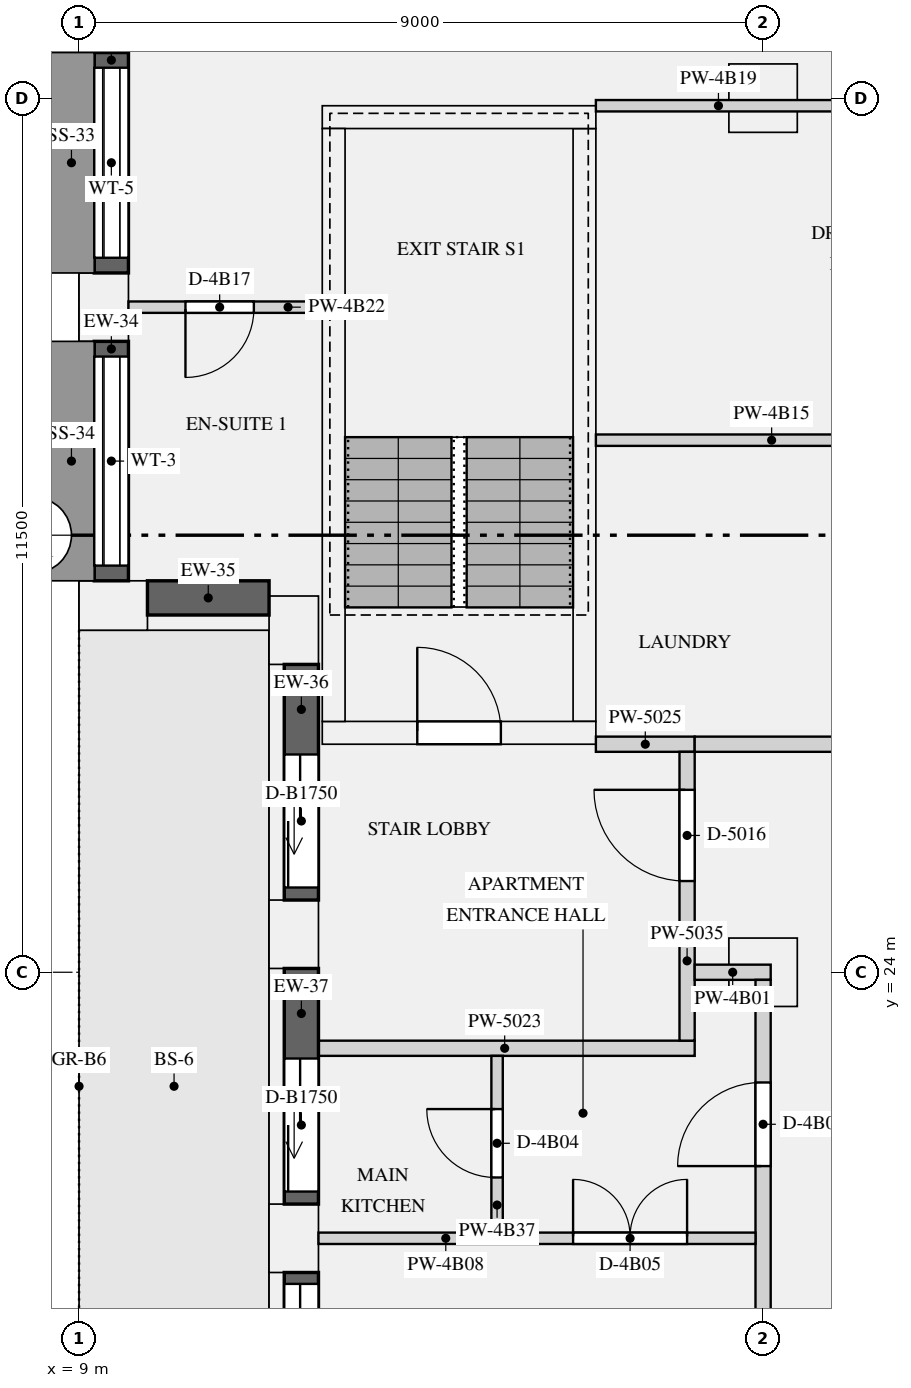
"""IFC4 building model, lengths in metres.
Left out: names, types, materials, properties, quantities, classifications, styles, units other than length and angle.
Written with IfcOpenShell. Run it as: python <this file> out.ifc"""

import sys

from ifc_helpers import new_model, si_unit, direction, frame, frame_2d, origin, origin_2d, place, context, subcontext, project, spatial, rectangle, extrude, element, fill, save


model = new_model("IFC4")
c1 = context("Model", 3, precision=1e-05, world=origin(), true_north=direction((0.0, 1.0)))
c2 = subcontext(c1, "Body", "Model", "MODEL_VIEW")
j1 = project(units=[si_unit("LENGTHUNIT", "METRE"), si_unit("PLANEANGLEUNIT", "RADIAN")], contexts=[c1])
p1 = place(None, origin())
s1 = spatial("IfcSite", under=j1, at=p1, CompositionType="ELEMENT")
p2 = place(p1, origin())
s2 = spatial("IfcBuilding", under=s1, at=p2, CompositionType="ELEMENT")
p3 = place(p2, frame((0.0, 0.0, 207.45)))
s3 = spatial("IfcBuildingStorey", under=s2, at=p3, CompositionType="ELEMENT", Elevation=207.45)
for number, where, z_axis, x_axis in (
    (1, (9.325, 32.75, 0.0), (0.0, 0.0, 1.0), (0.0, -1.0, 0.0)),
    (2, (9.45, 28.825, 0.0), (0.0, 0.0, 1.0), (1.0, 0.0, 0.0)),
    (3, (11.825, 28.5, 0.0), (0.0, 0.0, 1.0), (0.0, -1.0, 0.0)),
    (4, (11.825, 24.5, 0.0), (0.0, 0.0, 1.0), (0.0, -1.0, 0.0)),
    (5, (11.825, 20.5, 0.0), (0.0, 0.0, 1.0), (0.0, -1.0, 0.0)),
):
    element("IfcColumn", number, at=place(p3, frame(where, z_axis=z_axis, x_axis=x_axis)), inside=s3, PredefinedType="USERDEFINED", context=c2, shape_type="SweptSolid", body=[
        extrude(rectangle(XDim=0.9, YDim=0.65, at=origin_2d()), origin(), (0.0, 0.0, 1.0), 3.15),
    ])
for number, where, z_axis, x_axis in (
    (6, (18.0, 24.0, 0.0), (0.0, 0.0, 1.0), (1.0, 0.0, 0.0)),
    (7, (18.0, 35.5, 0.0), (0.0, 0.0, 1.0), (1.0, 0.0, 0.0)),
):
    element("IfcColumn", number, at=place(p3, frame(where, z_axis=z_axis, x_axis=x_axis)), inside=s3, PredefinedType="COLUMN", context=c2, shape_type="SweptSolid", body=[
        extrude(rectangle(XDim=0.9, YDim=0.9, at=origin_2d()), origin(), (0.0, 0.0, 1.0), 3.15),
    ])
p4 = place(p3, frame((12.2, 27.15, 0.0), z_axis=(0.0, 0.0, 1.0), x_axis=(1.0, 0.0, 0.0)))
e8 = element("IfcWall", 8, at=p4, inside=s3, PredefinedType="SHEAR", context=c2, shape_type="SweptSolid", body=[
    extrude(rectangle(XDim=3.6, YDim=0.3, at=frame_2d((1.8, 0.0))), origin(), (0.0, 0.0, 1.0), 3.15),
])
p5 = place(p4, frame((1.25, 0.0, 0.0)))
e9 = element("IfcOpeningElement", 9, at=p5, cuts=e8, PredefinedType="OPENING", context=c2, shape_type="SweptSolid", body=[
    extrude(rectangle(XDim=1.1, YDim=2.1, at=frame_2d((0.55, 1.05))), frame((0.0, 0.16, 0.0), z_axis=(0.0, -1.0, 0.0), x_axis=(1.0, 0.0, 0.0)), (0.0, 0.0, 1.0), 0.32),
])
p6 = place(p3, frame((12.2, 35.25, 0.0), z_axis=(0.0, 0.0, 1.0), x_axis=(1.0, 0.0, 0.0)))
e10 = element("IfcWall", 10, at=p6, inside=s3, PredefinedType="SHEAR", context=c2, shape_type="SweptSolid", body=[
    extrude(rectangle(XDim=3.6, YDim=0.3, at=frame_2d((1.8, 0.0))), origin(), (0.0, 0.0, 1.0), 3.15),
])
for number, where, z_axis, x_axis in (
    (11, (12.35, 27.3, 0.0), (0.0, 0.0, 1.0), (0.0, 1.0, 0.0)),
    (12, (15.65, 27.3, 0.0), (0.0, 0.0, 1.0), (0.0, 1.0, 0.0)),
):
    element("IfcWall", number, at=place(p3, frame(where, z_axis=z_axis, x_axis=x_axis)), inside=s3, PredefinedType="SHEAR", context=c2, shape_type="SweptSolid", body=[
        extrude(rectangle(XDim=7.8, YDim=0.3, at=frame_2d((3.9, 0.0))), origin(), (0.0, 0.0, 1.0), 3.15),
    ])
p7 = place(p3, frame((9.425, 36.1, 0.9), z_axis=(0.0, 0.0, 1.0), x_axis=(0.0, -1.0, 0.0)))
e13 = element("IfcWall", 13, at=p7, inside=s3, PredefinedType="SOLIDWALL", context=c2, shape_type="SweptSolid", body=[
    extrude(rectangle(XDim=2.9, YDim=0.45, at=frame_2d((1.45, 0.0))), origin(), (0.0, 0.0, 1.0), 1.93),
])
p8 = place(p7, frame((0.2, 0.0, 0.15)))
e14 = element("IfcOpeningElement", 14, at=p8, cuts=e13, PredefinedType="OPENING", context=c2, shape_type="SweptSolid", body=[
    extrude(rectangle(XDim=2.5, YDim=1.5, at=frame_2d((1.25, 0.75))), frame((0.0, 0.235, 0.0), z_axis=(0.0, -1.0, 0.0), x_axis=(1.0, 0.0, 0.0)), (0.0, 0.0, 1.0), 0.47),
])
p9 = place(p3, frame((9.425, 32.3, 0.9), z_axis=(0.0, 0.0, 1.0), x_axis=(0.0, -1.0, 0.0)))
e15 = element("IfcWall", 15, at=p9, inside=s3, PredefinedType="SOLIDWALL", context=c2, shape_type="SweptSolid", body=[
    extrude(rectangle(XDim=3.15, YDim=0.45, at=frame_2d((1.575, 0.0))), origin(), (0.0, 0.0, 1.0), 1.93),
])
p10 = place(p9, frame((0.2, 0.0, 0.15)))
e16 = element("IfcOpeningElement", 16, at=p10, cuts=e15, PredefinedType="OPENING", context=c2, shape_type="SweptSolid", body=[
    extrude(rectangle(XDim=2.75, YDim=1.5, at=frame_2d((1.375, 0.75))), frame((0.0, 0.235, 0.0), z_axis=(0.0, -1.0, 0.0), x_axis=(1.0, 0.0, 0.0)), (0.0, 0.0, 1.0), 0.47),
])
p11 = place(p3, frame((9.9, 28.925, 0.9), z_axis=(0.0, 0.0, 1.0), x_axis=(1.0, 0.0, 0.0)))
e17 = element("IfcWall", 17, at=p11, inside=s3, PredefinedType="SOLIDWALL", context=c2, shape_type="SweptSolid", body=[
    extrude(rectangle(XDim=1.6, YDim=0.45, at=frame_2d((0.8, 0.0))), origin(), (0.0, 0.0, 1.0), 1.93),
])
p12 = place(p3, frame((11.925, 28.05, 0.0), z_axis=(0.0, 0.0, 1.0), x_axis=(0.0, -1.0, 0.0)))
e18 = element("IfcWall", 18, at=p12, inside=s3, PredefinedType="SOLIDWALL", context=c2, shape_type="SweptSolid", body=[
    extrude(rectangle(XDim=3.1, YDim=0.45, at=frame_2d((1.55, 0.0))), origin(), (0.0, 0.0, 1.0), 2.83),
])
p13 = place(p12, frame((1.185, 0.0, 0.0)))
e19 = element("IfcOpeningElement", 19, at=p13, cuts=e18, PredefinedType="OPENING", context=c2, shape_type="SweptSolid", body=[
    extrude(rectangle(XDim=1.75, YDim=2.3, at=frame_2d((0.875, 1.15))), frame((0.0, 0.235, 0.0), z_axis=(0.0, -1.0, 0.0), x_axis=(1.0, 0.0, 0.0)), (0.0, 0.0, 1.0), 0.47),
])
p14 = place(p3, frame((11.925, 24.05, 0.0), z_axis=(0.0, 0.0, 1.0), x_axis=(0.0, -1.0, 0.0)))
e20 = element("IfcWall", 20, at=p14, inside=s3, PredefinedType="SOLIDWALL", context=c2, shape_type="SweptSolid", body=[
    extrude(rectangle(XDim=3.1, YDim=0.45, at=frame_2d((1.55, 0.0))), origin(), (0.0, 0.0, 1.0), 2.83),
])
p15 = place(p14, frame((1.185, 0.0, 0.0)))
e21 = element("IfcOpeningElement", 21, at=p15, cuts=e20, PredefinedType="OPENING", context=c2, shape_type="SweptSolid", body=[
    extrude(rectangle(XDim=1.75, YDim=2.3, at=frame_2d((0.875, 1.15))), frame((0.0, 0.235, 0.0), z_axis=(0.0, -1.0, 0.0), x_axis=(1.0, 0.0, 0.0)), (0.0, 0.0, 1.0), 0.47),
])
p16 = place(p3, frame((11.925, 20.05, 0.0), z_axis=(0.0, 0.0, 1.0), x_axis=(0.0, -1.0, 0.0)))
e22 = element("IfcWall", 22, at=p16, inside=s3, PredefinedType="SOLIDWALL", context=c2, shape_type="SweptSolid", body=[
    extrude(rectangle(XDim=3.55, YDim=0.45, at=frame_2d((1.775, 0.0))), origin(), (0.0, 0.0, 1.0), 2.83),
])
p17 = place(p16, frame((0.15, 0.0, 0.0)))
e23 = element("IfcOpeningElement", 23, at=p17, cuts=e22, PredefinedType="OPENING", context=c2, shape_type="SweptSolid", body=[
    extrude(rectangle(XDim=3.25, YDim=2.3, at=frame_2d((1.625, 1.15))), frame((0.0, 0.235, 0.0), z_axis=(0.0, -1.0, 0.0), x_axis=(1.0, 0.0, 0.0)), (0.0, 0.0, 1.0), 0.47),
])
p18 = place(p3, frame((12.1, 23.0, 0.0), z_axis=(0.0, 0.0, 1.0), x_axis=(1.0, 0.0, 0.0)))
e24 = element("IfcWall", 24, at=p18, inside=s3, PredefinedType="PARTITIONING", context=c2, shape_type="SweptSolid", body=[
    extrude(rectangle(XDim=5.0, YDim=0.2, at=frame_2d((2.5, 0.0))), origin(), (0.0, 0.0, 1.0), 2.83),
])
p19 = place(p3, frame((15.8, 27.0, 0.0), z_axis=(0.0, 0.0, 1.0), x_axis=(1.0, 0.0, 0.0)))
e25 = element("IfcWall", 25, at=p19, inside=s3, PredefinedType="PARTITIONING", context=c2, shape_type="SweptSolid", body=[
    extrude(rectangle(XDim=1.3, YDim=0.2, at=frame_2d((0.65, 0.0))), origin(), (0.0, 0.0, 1.0), 2.83),
])
p20 = place(p3, frame((17.0, 23.1, 0.0), z_axis=(0.0, 0.0, 1.0), x_axis=(0.0, 1.0, 0.0)))
e26 = element("IfcWall", 26, at=p20, inside=s3, PredefinedType="PARTITIONING", context=c2, shape_type="SweptSolid", body=[
    extrude(rectangle(XDim=3.8, YDim=0.2, at=frame_2d((1.9, 0.0))), origin(), (0.0, 0.0, 1.0), 2.83),
])
p21 = place(p20, frame((2.1, 0.0, 0.0)))
e27 = element("IfcOpeningElement", 27, at=p21, cuts=e26, PredefinedType="OPENING", context=c2, shape_type="SweptSolid", body=[
    extrude(rectangle(XDim=1.2, YDim=2.1, at=frame_2d((0.6, 1.05))), frame((0.0, 0.11, 0.0), z_axis=(0.0, -1.0, 0.0), x_axis=(1.0, 0.0, 0.0)), (0.0, 0.0, 1.0), 0.22),
])
p22 = place(p3, frame((17.1, 24.0, 0.0), z_axis=(0.0, 0.0, 1.0), x_axis=(1.0, 0.0, 0.0)))
e28 = element("IfcWall", 28, at=p22, inside=s3, PredefinedType="PARTITIONING", context=c2, shape_type="SweptSolid", body=[
    extrude(rectangle(XDim=1.0, YDim=0.2, at=frame_2d((0.5, 0.0))), origin(), (0.0, 0.0, 1.0), 2.83),
])
p23 = place(p3, frame((17.1, 27.0, 0.0), z_axis=(0.0, 0.0, 1.0), x_axis=(1.0, 0.0, 0.0)))
e29 = element("IfcWall", 29, at=p23, inside=s3, PredefinedType="PARTITIONING", context=c2, shape_type="SweptSolid", body=[
    extrude(rectangle(XDim=6.975, YDim=0.2, at=frame_2d((3.487, 0.0))), origin(), (0.0, 0.0, 1.0), 2.83),
])
p24 = place(p3, frame((12.15, 20.5, 0.0), z_axis=(0.0, 0.0, 1.0), x_axis=(1.0, 0.0, 0.0)))
e30 = element("IfcWall", 30, at=p24, inside=s3, PredefinedType="PARTITIONING", context=c2, shape_type="SweptSolid", body=[
    extrude(rectangle(XDim=5.75, YDim=0.15, at=frame_2d((2.875, 0.0))), origin(), (0.0, 0.0, 1.0), 2.83),
])
p25 = place(p24, frame((3.35, 0.0, 0.0)))
e31 = element("IfcOpeningElement", 31, at=p25, cuts=e30, PredefinedType="OPENING", context=c2, shape_type="SweptSolid", body=[
    extrude(rectangle(XDim=1.5, YDim=2.1, at=frame_2d((0.75, 1.05))), frame((0.0, 0.085, 0.0), z_axis=(0.0, -1.0, 0.0), x_axis=(1.0, 0.0, 0.0)), (0.0, 0.0, 1.0), 0.17),
])
p26 = place(p3, frame((15.8, 31.0, 0.0), z_axis=(0.0, 0.0, 1.0), x_axis=(1.0, 0.0, 0.0)))
e32 = element("IfcWall", 32, at=p26, inside=s3, PredefinedType="PARTITIONING", context=c2, shape_type="SweptSolid", body=[
    extrude(rectangle(XDim=4.625, YDim=0.15, at=frame_2d((2.312, 0.0))), origin(), (0.0, 0.0, 1.0), 2.83),
])
p27 = place(p3, frame((15.8, 35.4, 0.0), z_axis=(0.0, 0.0, 1.0), x_axis=(1.0, 0.0, 0.0)))
e33 = element("IfcWall", 33, at=p27, inside=s3, PredefinedType="PARTITIONING", context=c2, shape_type="SweptSolid", body=[
    extrude(rectangle(XDim=11.2, YDim=0.15, at=frame_2d((5.6, 0.0))), origin(), (0.0, 0.0, 1.0), 2.83),
])
p28 = place(p27, frame((8.725, 0.0, 0.0)))
e34 = element("IfcOpeningElement", 34, at=p28, cuts=e33, PredefinedType="OPENING", context=c2, shape_type="SweptSolid", body=[
    extrude(rectangle(XDim=1.5, YDim=2.1, at=frame_2d((0.75, 1.05))), frame((0.0, 0.085, 0.0), z_axis=(0.0, -1.0, 0.0), x_axis=(1.0, 0.0, 0.0)), (0.0, 0.0, 1.0), 0.17),
])
p29 = place(p27, frame((7.0, 0.0, 0.0)))
e35 = element("IfcOpeningElement", 35, at=p29, cuts=e33, PredefinedType="OPENING", context=c2, shape_type="SweptSolid", body=[
    extrude(rectangle(XDim=0.9, YDim=2.1, at=frame_2d((0.45, 1.05))), frame((0.0, 0.085, 0.0), z_axis=(0.0, -1.0, 0.0), x_axis=(1.0, 0.0, 0.0)), (0.0, 0.0, 1.0), 0.17),
])
p30 = place(p27, frame((3.225, 0.0, 0.0)))
e36 = element("IfcOpeningElement", 36, at=p30, cuts=e33, PredefinedType="OPENING", context=c2, shape_type="SweptSolid", body=[
    extrude(rectangle(XDim=0.9, YDim=2.1, at=frame_2d((0.45, 1.05))), frame((0.0, 0.085, 0.0), z_axis=(0.0, -1.0, 0.0), x_axis=(1.0, 0.0, 0.0)), (0.0, 0.0, 1.0), 0.17),
])
p31 = place(p3, frame((9.65, 32.75, 0.0), z_axis=(0.0, 0.0, 1.0), x_axis=(1.0, 0.0, 0.0)))
e37 = element("IfcWall", 37, at=p31, inside=s3, PredefinedType="PARTITIONING", context=c2, shape_type="SweptSolid", body=[
    extrude(rectangle(XDim=2.55, YDim=0.15, at=frame_2d((1.275, 0.0))), origin(), (0.0, 0.0, 1.0), 2.83),
])
p32 = place(p31, frame((0.75, 0.0, 0.0)))
e38 = element("IfcOpeningElement", 38, at=p32, cuts=e37, PredefinedType="OPENING", context=c2, shape_type="SweptSolid", body=[
    extrude(rectangle(XDim=0.9, YDim=2.1, at=frame_2d((0.45, 1.05))), frame((0.0, 0.085, 0.0), z_axis=(0.0, -1.0, 0.0), x_axis=(1.0, 0.0, 0.0)), (0.0, 0.0, 1.0), 0.17),
])
p33 = place(p3, frame((18.0, 16.1, 0.0), z_axis=(0.0, 0.0, 1.0), x_axis=(0.0, 1.0, 0.0)))
e39 = element("IfcWall", 39, at=p33, inside=s3, PredefinedType="PARTITIONING", context=c2, shape_type="SweptSolid", body=[
    extrude(rectangle(XDim=7.8, YDim=0.2, at=frame_2d((3.9, 0.0))), origin(), (0.0, 0.0, 1.0), 2.83),
])
p34 = place(p33, frame((5.35, 0.0, 0.0)))
e40 = element("IfcOpeningElement", 40, at=p34, cuts=e39, PredefinedType="OPENING", context=c2, shape_type="SweptSolid", body=[
    extrude(rectangle(XDim=1.1, YDim=2.1, at=frame_2d((0.55, 1.05))), frame((0.0, 0.11, 0.0), z_axis=(0.0, -1.0, 0.0), x_axis=(1.0, 0.0, 0.0)), (0.0, 0.0, 1.0), 0.22),
])
p35 = place(p3, frame((14.5, 20.575, 0.0), z_axis=(0.0, 0.0, 1.0), x_axis=(0.0, 1.0, 0.0)))
e41 = element("IfcWall", 41, at=p35, inside=s3, PredefinedType="PARTITIONING", context=c2, shape_type="SweptSolid", body=[
    extrude(rectangle(XDim=2.325, YDim=0.15, at=frame_2d((1.163, 0.0))), origin(), (0.0, 0.0, 1.0), 2.83),
])
p36 = place(p35, frame((0.725, 0.0, 0.0)))
e42 = element("IfcOpeningElement", 42, at=p36, cuts=e41, PredefinedType="OPENING", context=c2, shape_type="SweptSolid", body=[
    extrude(rectangle(XDim=0.9, YDim=2.1, at=frame_2d((0.45, 1.05))), frame((0.0, 0.085, 0.0), z_axis=(0.0, -1.0, 0.0), x_axis=(1.0, 0.0, 0.0)), (0.0, 0.0, 1.0), 0.17),
])
p37 = place(p8, origin())
e43 = element("IfcWindow", 43, at=p37, inside=s3, PartitioningType="SINGLE_PANEL", PredefinedType="WINDOW", context=c2, shape_type="SweptSolid", body=[
    extrude(rectangle(XDim=2.5, YDim=1.5, at=frame_2d((1.25, 0.75))), frame((0.0, -0.065, 0.0), z_axis=(0.0, -1.0, 0.0), x_axis=(1.0, 0.0, 0.0)), (0.0, 0.0, 1.0), 0.06),
])
fill(e14, e43)
p38 = place(p10, origin())
e44 = element("IfcWindow", 44, at=p38, inside=s3, PartitioningType="SINGLE_PANEL", PredefinedType="WINDOW", context=c2, shape_type="SweptSolid", body=[
    extrude(rectangle(XDim=2.75, YDim=1.5, at=frame_2d((1.375, 0.75))), frame((0.0, -0.065, 0.0), z_axis=(0.0, -1.0, 0.0), x_axis=(1.0, 0.0, 0.0)), (0.0, 0.0, 1.0), 0.06),
])
fill(e16, e44)
p39 = place(p13, frame((1.75, -0.19, 0.0), z_axis=(0.0, 0.0, 1.0), x_axis=(-1.0, 0.0, 0.0)))
e45 = element("IfcDoor", 45, at=p39, inside=s3, OperationType="SLIDING_TO_LEFT", PredefinedType="DOOR", context=c2, shape_type="SweptSolid", body=[
    extrude(rectangle(XDim=1.75, YDim=2.3, at=frame_2d((0.875, 1.15))), frame((0.0, -0.07, 0.0), z_axis=(0.0, -1.0, 0.0), x_axis=(1.0, 0.0, 0.0)), (0.0, 0.0, 1.0), 0.05),
])
fill(e19, e45)
p40 = place(p15, origin())
e46 = element("IfcDoor", 46, at=p40, inside=s3, OperationType="SLIDING_TO_LEFT", PredefinedType="DOOR", context=c2, shape_type="SweptSolid", body=[
    extrude(rectangle(XDim=1.75, YDim=2.3, at=frame_2d((0.875, 1.15))), frame((0.0, -0.07, 0.0), z_axis=(0.0, -1.0, 0.0), x_axis=(1.0, 0.0, 0.0)), (0.0, 0.0, 1.0), 0.05),
])
fill(e21, e46)
p41 = place(p17, origin())
e47 = element("IfcDoor", 47, at=p41, inside=s3, OperationType="SLIDING_TO_LEFT", PredefinedType="DOOR", context=c2, shape_type="SweptSolid", body=[
    extrude(rectangle(XDim=3.25, YDim=2.3, at=frame_2d((1.625, 1.15))), frame((0.0, -0.07, 0.0), z_axis=(0.0, -1.0, 0.0), x_axis=(1.0, 0.0, 0.0)), (0.0, 0.0, 1.0), 0.05),
])
fill(e23, e47)
p42 = place(p5, origin())
e48 = element("IfcDoor", 48, at=p42, inside=s3, OperationType="SINGLE_SWING_LEFT", PredefinedType="DOOR", context=c2, shape_type="SweptSolid", body=[
    extrude(rectangle(XDim=1.1, YDim=2.1, at=frame_2d((0.55, 1.05))), frame((0.0, 0.025, 0.0), z_axis=(0.0, -1.0, 0.0), x_axis=(1.0, 0.0, 0.0)), (0.0, 0.0, 1.0), 0.05),
])
fill(e9, e48)
p43 = place(p21, origin())
e49 = element("IfcDoor", 49, at=p43, inside=s3, OperationType="SINGLE_SWING_RIGHT", PredefinedType="DOOR", context=c2, shape_type="SweptSolid", body=[
    extrude(rectangle(XDim=1.2, YDim=2.1, at=frame_2d((0.6, 1.05))), frame((0.0, 0.025, 0.0), z_axis=(0.0, -1.0, 0.0), x_axis=(1.0, 0.0, 0.0)), (0.0, 0.0, 1.0), 0.05),
])
fill(e27, e49)
p44 = place(p34, origin())
e50 = element("IfcDoor", 50, at=p44, inside=s3, OperationType="SINGLE_SWING_LEFT", PredefinedType="DOOR", context=c2, shape_type="SweptSolid", body=[
    extrude(rectangle(XDim=1.1, YDim=2.1, at=frame_2d((0.55, 1.05))), frame((0.0, 0.025, 0.0), z_axis=(0.0, -1.0, 0.0), x_axis=(1.0, 0.0, 0.0)), (0.0, 0.0, 1.0), 0.05),
])
fill(e40, e50)
p45 = place(p36, origin())
e51 = element("IfcDoor", 51, at=p45, inside=s3, OperationType="SINGLE_SWING_RIGHT", PredefinedType="DOOR", context=c2, shape_type="SweptSolid", body=[
    extrude(rectangle(XDim=0.9, YDim=2.1, at=frame_2d((0.45, 1.05))), frame((0.0, 0.025, 0.0), z_axis=(0.0, -1.0, 0.0), x_axis=(1.0, 0.0, 0.0)), (0.0, 0.0, 1.0), 0.05),
])
fill(e42, e51)
p46 = place(p25, origin())
e52 = element("IfcDoor", 52, at=p46, inside=s3, OperationType="DOUBLE_DOOR_SINGLE_SWING", PredefinedType="DOOR", context=c2, shape_type="SweptSolid", body=[
    extrude(rectangle(XDim=1.5, YDim=2.1, at=frame_2d((0.75, 1.05))), frame((0.0, 0.025, 0.0), z_axis=(0.0, -1.0, 0.0), x_axis=(1.0, 0.0, 0.0)), (0.0, 0.0, 1.0), 0.05),
])
fill(e31, e52)
p47 = place(p32, frame((0.9, 0.0, 0.0), z_axis=(0.0, 0.0, 1.0), x_axis=(-1.0, 0.0, 0.0)))
e53 = element("IfcDoor", 53, at=p47, inside=s3, OperationType="SINGLE_SWING_RIGHT", PredefinedType="DOOR", context=c2, shape_type="SweptSolid", body=[
    extrude(rectangle(XDim=0.9, YDim=2.1, at=frame_2d((0.45, 1.05))), frame((0.0, 0.025, 0.0), z_axis=(0.0, -1.0, 0.0), x_axis=(1.0, 0.0, 0.0)), (0.0, 0.0, 1.0), 0.05),
])
fill(e38, e53)
save(model, sys.argv[1])
